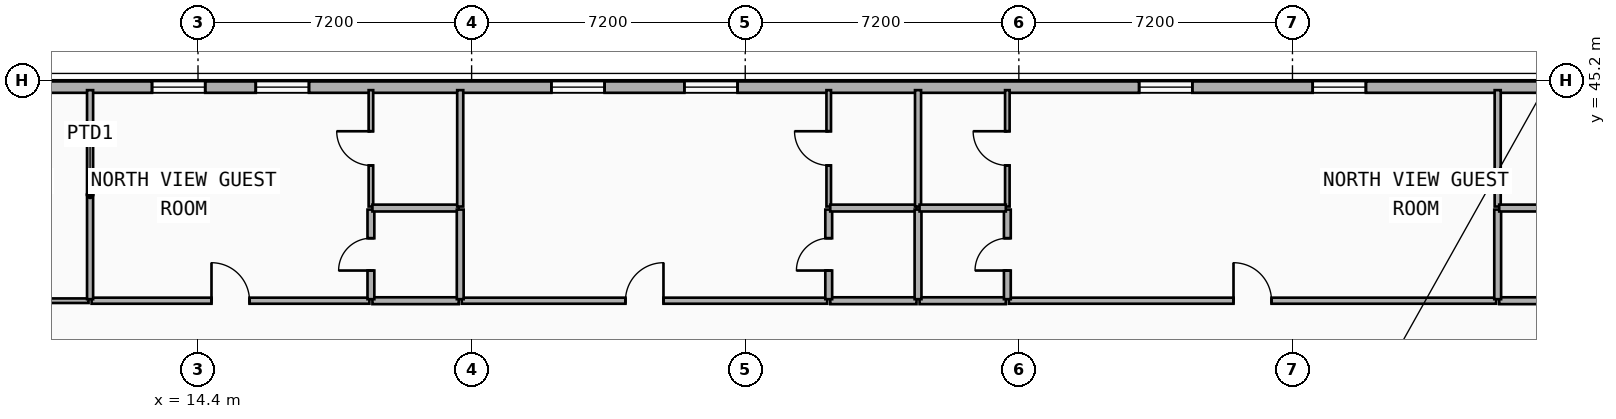
"""IFC4 building model, lengths in metres.
Left out: names, types, materials, properties, quantities, classifications, styles, units other than length and angle.
Written with IfcOpenShell. Run it as: python <this file> out.ifc"""

import sys

from ifc_helpers import new_model, si_unit, direction, frame, frame_2d, origin, place, context, subcontext, project, spatial, rectangle, extrude, element, fill, save


model = new_model("IFC4")
c1 = context("Model", 3, precision=1e-05, world=origin(), true_north=direction((0.0, 1.0)))
c2 = subcontext(c1, "Body", "Model", "MODEL_VIEW")
j1 = project(units=[si_unit("LENGTHUNIT", "METRE"), si_unit("PLANEANGLEUNIT", "RADIAN")], contexts=[c1])
p1 = place(None, origin())
s1 = spatial("IfcSite", under=j1, at=p1, CompositionType="ELEMENT")
p2 = place(p1, origin())
s2 = spatial("IfcBuilding", under=s1, at=p2, CompositionType="ELEMENT")
p3 = place(p2, frame((0.0, 0.0, 50.0)))
s3 = spatial("IfcBuildingStorey", under=s2, at=p3, CompositionType="ELEMENT", Elevation=50.0)
p4 = place(p3, frame((4.2, 45.02, 0.0), z_axis=(0.0, 0.0, 1.0), x_axis=(1.0, 0.0, 0.0)))
e1 = element("IfcWall", 1, at=p4, inside=s3, PredefinedType="SOLIDWALL", context=c2, shape_type="SweptSolid", body=[
    extrude(rectangle(XDim=49.2, YDim=0.3, at=frame_2d((24.6, 0.0))), origin(), (0.0, 0.0, 1.0), 3.24),
])
p5 = place(p4, frame((8.99, 0.0, 0.85)))
e2 = element("IfcOpeningElement", 2, at=p5, cuts=e1, PredefinedType="OPENING", context=c2, shape_type="SweptSolid", body=[
    extrude(rectangle(XDim=1.4, YDim=1.8, at=frame_2d((0.7, 0.9))), frame((0.0, 0.16, 0.0), z_axis=(0.0, -1.0, 0.0), x_axis=(1.0, 0.0, 0.0)), (0.0, 0.0, 1.0), 0.32),
])
p6 = place(p4, frame((11.72, 0.0, 0.85)))
e3 = element("IfcOpeningElement", 3, at=p6, cuts=e1, PredefinedType="OPENING", context=c2, shape_type="SweptSolid", body=[
    extrude(rectangle(XDim=1.4, YDim=1.8, at=frame_2d((0.7, 0.9))), frame((0.0, 0.16, 0.0), z_axis=(0.0, -1.0, 0.0), x_axis=(1.0, 0.0, 0.0)), (0.0, 0.0, 1.0), 0.32),
])
p7 = place(p4, frame((19.499, 0.0, 0.85)))
e4 = element("IfcOpeningElement", 4, at=p7, cuts=e1, PredefinedType="OPENING", context=c2, shape_type="SweptSolid", body=[
    extrude(rectangle(XDim=1.4, YDim=1.8, at=frame_2d((0.7, 0.9))), frame((0.0, 0.16, 0.0), z_axis=(0.0, -1.0, 0.0), x_axis=(1.0, 0.0, 0.0)), (0.0, 0.0, 1.0), 0.32),
])
p8 = place(p4, frame((22.998, 0.0, 0.85)))
e5 = element("IfcOpeningElement", 5, at=p8, cuts=e1, PredefinedType="OPENING", context=c2, shape_type="SweptSolid", body=[
    extrude(rectangle(XDim=1.4, YDim=1.8, at=frame_2d((0.7, 0.9))), frame((0.0, 0.16, 0.0), z_axis=(0.0, -1.0, 0.0), x_axis=(1.0, 0.0, 0.0)), (0.0, 0.0, 1.0), 0.32),
])
p9 = place(p4, frame((34.965, 0.0, 0.85)))
e6 = element("IfcOpeningElement", 6, at=p9, cuts=e1, PredefinedType="OPENING", context=c2, shape_type="SweptSolid", body=[
    extrude(rectangle(XDim=1.4, YDim=1.8, at=frame_2d((0.7, 0.9))), frame((0.0, 0.16, 0.0), z_axis=(0.0, -1.0, 0.0), x_axis=(1.0, 0.0, 0.0)), (0.0, 0.0, 1.0), 0.32),
])
p10 = place(p4, frame((39.532, 0.0, 0.85)))
e7 = element("IfcOpeningElement", 7, at=p10, cuts=e1, PredefinedType="OPENING", context=c2, shape_type="SweptSolid", body=[
    extrude(rectangle(XDim=1.4, YDim=1.8, at=frame_2d((0.7, 0.9))), frame((0.0, 0.16, 0.0), z_axis=(0.0, -1.0, 0.0), x_axis=(1.0, 0.0, 0.0)), (0.0, 0.0, 1.0), 0.32),
])
p11 = place(p4, frame((47.265, 0.0, 0.85)))
e8 = element("IfcOpeningElement", 8, at=p11, cuts=e1, PredefinedType="OPENING", context=c2, shape_type="SweptSolid", body=[
    extrude(rectangle(XDim=1.4, YDim=1.8, at=frame_2d((0.7, 0.9))), frame((0.0, 0.16, 0.0), z_axis=(0.0, -1.0, 0.0), x_axis=(1.0, 0.0, 0.0)), (0.0, 0.0, 1.0), 0.32),
])
p12 = place(p3, frame((0.26, 39.4, 0.0), z_axis=(0.0, 0.0, 1.0), x_axis=(1.0, 0.0, 0.0)))
e9 = element("IfcWall", 9, at=p12, inside=s3, PredefinedType="PARTITIONING", context=c2, shape_type="SweptSolid", body=[
    extrude(rectangle(XDim=11.26, YDim=0.12, at=frame_2d((5.63, 0.0))), origin(), (0.0, 0.0, 1.0), 3.24),
])
p13 = place(p12, frame((5.18, 0.0, 0.0)))
e10 = element("IfcOpeningElement", 10, at=p13, cuts=e9, PredefinedType="OPENING", context=c2, shape_type="SweptSolid", body=[
    extrude(rectangle(XDim=0.9, YDim=2.1, at=frame_2d((0.45, 1.05))), frame((0.0, 0.07, 0.0), z_axis=(0.0, -1.0, 0.0), x_axis=(1.0, 0.0, 0.0)), (0.0, 0.0, 1.0), 0.14),
])
p14 = place(p3, frame((11.6, 39.4, 0.0), z_axis=(0.0, 0.0, 1.0), x_axis=(1.0, 0.0, 0.0)))
e11 = element("IfcWall", 11, at=p14, inside=s3, PredefinedType="PARTITIONING", context=c2, shape_type="SweptSolid", body=[
    extrude(rectangle(XDim=7.31, YDim=0.16, at=frame_2d((3.655, 0.0))), origin(), (0.0, 0.0, 1.0), 3.24),
])
p15 = place(p14, frame((3.155, 0.0, 0.0)))
e12 = element("IfcOpeningElement", 12, at=p15, cuts=e11, PredefinedType="OPENING", context=c2, shape_type="SweptSolid", body=[
    extrude(rectangle(XDim=1.0, YDim=2.15, at=frame_2d((0.5, 1.075))), frame((0.0, 0.09, 0.0), z_axis=(0.0, -1.0, 0.0), x_axis=(1.0, 0.0, 0.0)), (0.0, 0.0, 1.0), 0.18),
])
p16 = place(p3, frame((18.99, 39.4, 0.0), z_axis=(0.0, 0.0, 1.0), x_axis=(1.0, 0.0, 0.0)))
e13 = element("IfcWall", 13, at=p16, inside=s3, PredefinedType="PLUMBINGWALL", context=c2, shape_type="SweptSolid", body=[
    extrude(rectangle(XDim=2.27, YDim=0.18, at=frame_2d((1.135, 0.0))), origin(), (0.0, 0.0, 1.0), 3.24),
])
p17 = place(p3, frame((21.34, 39.4, 0.0), z_axis=(0.0, 0.0, 1.0), x_axis=(1.0, 0.0, 0.0)))
e14 = element("IfcWall", 14, at=p17, inside=s3, PredefinedType="PARTITIONING", context=c2, shape_type="SweptSolid", body=[
    extrude(rectangle(XDim=9.617, YDim=0.16, at=frame_2d((4.809, 0.0))), origin(), (0.0, 0.0, 1.0), 3.24),
])
p18 = place(p17, frame((4.309, 0.0, 0.0)))
e15 = element("IfcOpeningElement", 15, at=p18, cuts=e14, PredefinedType="OPENING", context=c2, shape_type="SweptSolid", body=[
    extrude(rectangle(XDim=1.0, YDim=2.15, at=frame_2d((0.5, 1.075))), frame((0.0, 0.09, 0.0), z_axis=(0.0, -1.0, 0.0), x_axis=(1.0, 0.0, 0.0)), (0.0, 0.0, 1.0), 0.18),
])
p19 = place(p3, frame((31.037, 39.4, 0.0), z_axis=(0.0, 0.0, 1.0), x_axis=(1.0, 0.0, 0.0)))
e16 = element("IfcWall", 16, at=p19, inside=s3, PredefinedType="PLUMBINGWALL", context=c2, shape_type="SweptSolid", body=[
    extrude(rectangle(XDim=2.27, YDim=0.18, at=frame_2d((1.135, 0.0))), origin(), (0.0, 0.0, 1.0), 3.24),
])
p20 = place(p3, frame((35.737, 39.4, 0.0), z_axis=(0.0, 0.0, 1.0), x_axis=(1.0, 0.0, 0.0)))
e17 = element("IfcWall", 17, at=p20, inside=s3, PredefinedType="PARTITIONING", context=c2, shape_type="SweptSolid", body=[
    extrude(rectangle(XDim=12.823, YDim=0.16, at=frame_2d((6.412, 0.0))), origin(), (0.0, 0.0, 1.0), 3.24),
])
p21 = place(p20, frame((5.912, 0.0, 0.0)))
e18 = element("IfcOpeningElement", 18, at=p21, cuts=e17, PredefinedType="OPENING", context=c2, shape_type="SweptSolid", body=[
    extrude(rectangle(XDim=1.0, YDim=2.15, at=frame_2d((0.5, 1.075))), frame((0.0, 0.09, 0.0), z_axis=(0.0, -1.0, 0.0), x_axis=(1.0, 0.0, 0.0)), (0.0, 0.0, 1.0), 0.18),
])
for number, where, z_axis, x_axis in (
    (19, (33.387, 39.4, 0.0), (0.0, 0.0, 1.0), (1.0, 0.0, 0.0)),
    (20, (48.64, 39.4, 0.0), (0.0, 0.0, 1.0), (1.0, 0.0, 0.0)),
):
    element("IfcWall", number, at=place(p3, frame(where, z_axis=z_axis, x_axis=x_axis)), inside=s3, PredefinedType="PLUMBINGWALL", context=c2, shape_type="SweptSolid", body=[
        extrude(rectangle(XDim=2.27, YDim=0.18, at=frame_2d((1.135, 0.0))), origin(), (0.0, 0.0, 1.0), 3.24),
    ])
p22 = place(p3, frame((11.56, 39.44, 0.0), z_axis=(0.0, 0.0, 1.0), x_axis=(0.0, 1.0, 0.0)))
e21 = element("IfcWall", 21, at=p22, inside=s3, PredefinedType="PARTITIONING", context=c2, shape_type="SweptSolid", body=[
    extrude(rectangle(XDim=5.5, YDim=0.16, at=frame_2d((2.75, 0.0))), origin(), (0.0, 0.0, 1.0), 3.24),
])
p23 = place(p3, frame((18.95, 39.44, 0.0), z_axis=(0.0, 0.0, 1.0), x_axis=(0.0, 1.0, 0.0)))
e22 = element("IfcWall", 22, at=p23, inside=s3, PredefinedType="PLUMBINGWALL", context=c2, shape_type="SweptSolid", body=[
    extrude(rectangle(XDim=2.358, YDim=0.18, at=frame_2d((1.179, 0.0))), origin(), (0.0, 0.0, 1.0), 3.24),
])
p24 = place(p23, frame((0.754, 0.0, 0.0)))
e23 = element("IfcOpeningElement", 23, at=p24, cuts=e22, PredefinedType="OPENING", context=c2, shape_type="SweptSolid", body=[
    extrude(rectangle(XDim=0.85, YDim=2.1, at=frame_2d((0.425, 1.05))), frame((0.0, 0.1, 0.0), z_axis=(0.0, -1.0, 0.0), x_axis=(1.0, 0.0, 0.0)), (0.0, 0.0, 1.0), 0.2),
])
p25 = place(p3, frame((18.95, 41.878, 0.0), z_axis=(0.0, 0.0, 1.0), x_axis=(0.0, 1.0, 0.0)))
e24 = element("IfcWall", 24, at=p25, inside=s3, PredefinedType="PARTITIONING", context=c2, shape_type="SweptSolid", body=[
    extrude(rectangle(XDim=3.062, YDim=0.12, at=frame_2d((1.531, 0.0))), origin(), (0.0, 0.0, 1.0), 3.24),
])
p26 = place(p25, frame((1.081, 0.0, 0.0)))
e25 = element("IfcOpeningElement", 25, at=p26, cuts=e24, PredefinedType="OPENING", context=c2, shape_type="SweptSolid", body=[
    extrude(rectangle(XDim=0.9, YDim=2.1, at=frame_2d((0.45, 1.05))), frame((0.0, 0.07, 0.0), z_axis=(0.0, -1.0, 0.0), x_axis=(1.0, 0.0, 0.0)), (0.0, 0.0, 1.0), 0.14),
])
p27 = place(p3, frame((18.99, 41.838, 0.0), z_axis=(0.0, 0.0, 1.0), x_axis=(1.0, 0.0, 0.0)))
e26 = element("IfcWall", 26, at=p27, inside=s3, PredefinedType="PLUMBINGWALL", context=c2, shape_type="SweptSolid", body=[
    extrude(rectangle(XDim=2.27, YDim=0.18, at=frame_2d((1.135, 0.0))), origin(), (0.0, 0.0, 1.0), 3.24),
])
p28 = place(p3, frame((21.3, 39.44, 0.0), z_axis=(0.0, 0.0, 1.0), x_axis=(0.0, 1.0, 0.0)))
e27 = element("IfcWall", 27, at=p28, inside=s3, PredefinedType="PLUMBINGWALL", context=c2, shape_type="SweptSolid", body=[
    extrude(rectangle(XDim=2.358, YDim=0.18, at=frame_2d((1.179, 0.0))), origin(), (0.0, 0.0, 1.0), 3.24),
])
p29 = place(p3, frame((21.3, 41.878, 0.0), z_axis=(0.0, 0.0, 1.0), x_axis=(0.0, 1.0, 0.0)))
e28 = element("IfcWall", 28, at=p29, inside=s3, PredefinedType="PARTITIONING", context=c2, shape_type="SweptSolid", body=[
    extrude(rectangle(XDim=3.062, YDim=0.16, at=frame_2d((1.531, 0.0))), origin(), (0.0, 0.0, 1.0), 3.24),
])
p30 = place(p3, frame((30.997, 39.44, 0.0), z_axis=(0.0, 0.0, 1.0), x_axis=(0.0, 1.0, 0.0)))
e29 = element("IfcWall", 29, at=p30, inside=s3, PredefinedType="PLUMBINGWALL", context=c2, shape_type="SweptSolid", body=[
    extrude(rectangle(XDim=2.358, YDim=0.18, at=frame_2d((1.179, 0.0))), origin(), (0.0, 0.0, 1.0), 3.24),
])
p31 = place(p30, frame((0.754, 0.0, 0.0)))
e30 = element("IfcOpeningElement", 30, at=p31, cuts=e29, PredefinedType="OPENING", context=c2, shape_type="SweptSolid", body=[
    extrude(rectangle(XDim=0.85, YDim=2.1, at=frame_2d((0.425, 1.05))), frame((0.0, 0.1, 0.0), z_axis=(0.0, -1.0, 0.0), x_axis=(1.0, 0.0, 0.0)), (0.0, 0.0, 1.0), 0.2),
])
p32 = place(p3, frame((30.997, 41.878, 0.0), z_axis=(0.0, 0.0, 1.0), x_axis=(0.0, 1.0, 0.0)))
e31 = element("IfcWall", 31, at=p32, inside=s3, PredefinedType="PARTITIONING", context=c2, shape_type="SweptSolid", body=[
    extrude(rectangle(XDim=3.062, YDim=0.12, at=frame_2d((1.531, 0.0))), origin(), (0.0, 0.0, 1.0), 3.24),
])
p33 = place(p32, frame((1.081, 0.0, 0.0)))
e32 = element("IfcOpeningElement", 32, at=p33, cuts=e31, PredefinedType="OPENING", context=c2, shape_type="SweptSolid", body=[
    extrude(rectangle(XDim=0.9, YDim=2.1, at=frame_2d((0.45, 1.05))), frame((0.0, 0.07, 0.0), z_axis=(0.0, -1.0, 0.0), x_axis=(1.0, 0.0, 0.0)), (0.0, 0.0, 1.0), 0.14),
])
p34 = place(p3, frame((31.037, 41.838, 0.0), z_axis=(0.0, 0.0, 1.0), x_axis=(1.0, 0.0, 0.0)))
e33 = element("IfcWall", 33, at=p34, inside=s3, PredefinedType="PLUMBINGWALL", context=c2, shape_type="SweptSolid", body=[
    extrude(rectangle(XDim=2.27, YDim=0.18, at=frame_2d((1.135, 0.0))), origin(), (0.0, 0.0, 1.0), 3.24),
])
p35 = place(p3, frame((33.347, 39.44, 0.0), z_axis=(0.0, 0.0, 1.0), x_axis=(0.0, 1.0, 0.0)))
e34 = element("IfcWall", 34, at=p35, inside=s3, PredefinedType="PLUMBINGWALL", context=c2, shape_type="SweptSolid", body=[
    extrude(rectangle(XDim=2.358, YDim=0.18, at=frame_2d((1.179, 0.0))), origin(), (0.0, 0.0, 1.0), 3.24),
])
p36 = place(p3, frame((33.347, 41.878, 0.0), z_axis=(0.0, 0.0, 1.0), x_axis=(0.0, 1.0, 0.0)))
e35 = element("IfcWall", 35, at=p36, inside=s3, PredefinedType="PARTITIONING", context=c2, shape_type="SweptSolid", body=[
    extrude(rectangle(XDim=3.062, YDim=0.16, at=frame_2d((1.531, 0.0))), origin(), (0.0, 0.0, 1.0), 3.24),
])
p37 = place(p3, frame((35.697, 39.44, 0.0), z_axis=(0.0, 0.0, 1.0), x_axis=(0.0, 1.0, 0.0)))
e36 = element("IfcWall", 36, at=p37, inside=s3, PredefinedType="PLUMBINGWALL", context=c2, shape_type="SweptSolid", body=[
    extrude(rectangle(XDim=2.358, YDim=0.18, at=frame_2d((1.179, 0.0))), origin(), (0.0, 0.0, 1.0), 3.24),
])
p38 = place(p37, frame((0.754, 0.0, 0.0)))
e37 = element("IfcOpeningElement", 37, at=p38, cuts=e36, PredefinedType="OPENING", context=c2, shape_type="SweptSolid", body=[
    extrude(rectangle(XDim=0.85, YDim=2.1, at=frame_2d((0.425, 1.05))), frame((0.0, 0.1, 0.0), z_axis=(0.0, -1.0, 0.0), x_axis=(1.0, 0.0, 0.0)), (0.0, 0.0, 1.0), 0.2),
])
p39 = place(p3, frame((35.697, 41.878, 0.0), z_axis=(0.0, 0.0, 1.0), x_axis=(0.0, 1.0, 0.0)))
e38 = element("IfcWall", 38, at=p39, inside=s3, PredefinedType="PARTITIONING", context=c2, shape_type="SweptSolid", body=[
    extrude(rectangle(XDim=3.062, YDim=0.12, at=frame_2d((1.531, 0.0))), origin(), (0.0, 0.0, 1.0), 3.24),
])
p40 = place(p39, frame((1.081, 0.0, 0.0)))
e39 = element("IfcOpeningElement", 39, at=p40, cuts=e38, PredefinedType="OPENING", context=c2, shape_type="SweptSolid", body=[
    extrude(rectangle(XDim=0.9, YDim=2.1, at=frame_2d((0.45, 1.05))), frame((0.0, 0.07, 0.0), z_axis=(0.0, -1.0, 0.0), x_axis=(1.0, 0.0, 0.0)), (0.0, 0.0, 1.0), 0.14),
])
p41 = place(p3, frame((48.6, 39.44, 0.0), z_axis=(0.0, 0.0, 1.0), x_axis=(0.0, 1.0, 0.0)))
e40 = element("IfcWall", 40, at=p41, inside=s3, PredefinedType="PLUMBINGWALL", context=c2, shape_type="SweptSolid", body=[
    extrude(rectangle(XDim=2.358, YDim=0.18, at=frame_2d((1.179, 0.0))), origin(), (0.0, 0.0, 1.0), 3.24),
])
p42 = place(p3, frame((48.6, 41.878, 0.0), z_axis=(0.0, 0.0, 1.0), x_axis=(0.0, 1.0, 0.0)))
e41 = element("IfcWall", 41, at=p42, inside=s3, PredefinedType="PARTITIONING", context=c2, shape_type="SweptSolid", body=[
    extrude(rectangle(XDim=3.062, YDim=0.16, at=frame_2d((1.531, 0.0))), origin(), (0.0, 0.0, 1.0), 3.24),
])
for number, where, z_axis, x_axis in (
    (42, (33.387, 41.838, 0.0), (0.0, 0.0, 1.0), (1.0, 0.0, 0.0)),
    (43, (48.64, 41.838, 0.0), (0.0, 0.0, 1.0), (1.0, 0.0, 0.0)),
):
    element("IfcWall", number, at=place(p3, frame(where, z_axis=z_axis, x_axis=x_axis)), inside=s3, PredefinedType="PLUMBINGWALL", context=c2, shape_type="SweptSolid", body=[
        extrude(rectangle(XDim=2.27, YDim=0.18, at=frame_2d((1.135, 0.0))), origin(), (0.0, 0.0, 1.0), 3.24),
    ])
p43 = place(p5, origin())
e44 = element("IfcWindow", 44, at=p43, inside=s3, PartitioningType="SINGLE_PANEL", PredefinedType="WINDOW", context=c2, shape_type="SweptSolid", body=[
    extrude(rectangle(XDim=1.4, YDim=1.8, at=frame_2d((0.7, 0.9))), frame((0.0, 0.03, 0.0), z_axis=(0.0, -1.0, 0.0), x_axis=(1.0, 0.0, 0.0)), (0.0, 0.0, 1.0), 0.06),
])
fill(e2, e44)
p44 = place(p6, origin())
e45 = element("IfcWindow", 45, at=p44, inside=s3, PartitioningType="SINGLE_PANEL", PredefinedType="WINDOW", context=c2, shape_type="SweptSolid", body=[
    extrude(rectangle(XDim=1.4, YDim=1.8, at=frame_2d((0.7, 0.9))), frame((0.0, 0.03, 0.0), z_axis=(0.0, -1.0, 0.0), x_axis=(1.0, 0.0, 0.0)), (0.0, 0.0, 1.0), 0.06),
])
fill(e3, e45)
p45 = place(p7, origin())
e46 = element("IfcWindow", 46, at=p45, inside=s3, PartitioningType="SINGLE_PANEL", PredefinedType="WINDOW", context=c2, shape_type="SweptSolid", body=[
    extrude(rectangle(XDim=1.4, YDim=1.8, at=frame_2d((0.7, 0.9))), frame((0.0, 0.03, 0.0), z_axis=(0.0, -1.0, 0.0), x_axis=(1.0, 0.0, 0.0)), (0.0, 0.0, 1.0), 0.06),
])
fill(e4, e46)
p46 = place(p8, origin())
e47 = element("IfcWindow", 47, at=p46, inside=s3, PartitioningType="SINGLE_PANEL", PredefinedType="WINDOW", context=c2, shape_type="SweptSolid", body=[
    extrude(rectangle(XDim=1.4, YDim=1.8, at=frame_2d((0.7, 0.9))), frame((0.0, 0.03, 0.0), z_axis=(0.0, -1.0, 0.0), x_axis=(1.0, 0.0, 0.0)), (0.0, 0.0, 1.0), 0.06),
])
fill(e5, e47)
p47 = place(p9, origin())
e48 = element("IfcWindow", 48, at=p47, inside=s3, PartitioningType="SINGLE_PANEL", PredefinedType="WINDOW", context=c2, shape_type="SweptSolid", body=[
    extrude(rectangle(XDim=1.4, YDim=1.8, at=frame_2d((0.7, 0.9))), frame((0.0, 0.03, 0.0), z_axis=(0.0, -1.0, 0.0), x_axis=(1.0, 0.0, 0.0)), (0.0, 0.0, 1.0), 0.06),
])
fill(e6, e48)
p48 = place(p10, origin())
e49 = element("IfcWindow", 49, at=p48, inside=s3, PartitioningType="SINGLE_PANEL", PredefinedType="WINDOW", context=c2, shape_type="SweptSolid", body=[
    extrude(rectangle(XDim=1.4, YDim=1.8, at=frame_2d((0.7, 0.9))), frame((0.0, 0.03, 0.0), z_axis=(0.0, -1.0, 0.0), x_axis=(1.0, 0.0, 0.0)), (0.0, 0.0, 1.0), 0.06),
])
fill(e7, e49)
p49 = place(p15, origin())
e50 = element("IfcDoor", 50, at=p49, inside=s3, OperationType="SINGLE_SWING_LEFT", PredefinedType="DOOR", context=c2, shape_type="SweptSolid", body=[
    extrude(rectangle(XDim=1.0, YDim=2.15, at=frame_2d((0.5, 1.075))), frame((0.0, 0.025, 0.0), z_axis=(0.0, -1.0, 0.0), x_axis=(1.0, 0.0, 0.0)), (0.0, 0.0, 1.0), 0.05),
])
fill(e12, e50)
p50 = place(p18, origin())
e51 = element("IfcDoor", 51, at=p50, inside=s3, OperationType="SINGLE_SWING_RIGHT", PredefinedType="DOOR", context=c2, shape_type="SweptSolid", body=[
    extrude(rectangle(XDim=1.0, YDim=2.15, at=frame_2d((0.5, 1.075))), frame((0.0, 0.025, 0.0), z_axis=(0.0, -1.0, 0.0), x_axis=(1.0, 0.0, 0.0)), (0.0, 0.0, 1.0), 0.05),
])
fill(e15, e51)
p51 = place(p21, origin())
e52 = element("IfcDoor", 52, at=p51, inside=s3, OperationType="SINGLE_SWING_LEFT", PredefinedType="DOOR", context=c2, shape_type="SweptSolid", body=[
    extrude(rectangle(XDim=1.0, YDim=2.15, at=frame_2d((0.5, 1.075))), frame((0.0, 0.025, 0.0), z_axis=(0.0, -1.0, 0.0), x_axis=(1.0, 0.0, 0.0)), (0.0, 0.0, 1.0), 0.05),
])
fill(e18, e52)
p52 = place(p24, origin())
e53 = element("IfcDoor", 53, at=p52, inside=s3, OperationType="SINGLE_SWING_LEFT", PredefinedType="DOOR", context=c2, shape_type="SweptSolid", body=[
    extrude(rectangle(XDim=0.85, YDim=2.1, at=frame_2d((0.425, 1.05))), frame((0.0, 0.025, 0.0), z_axis=(0.0, -1.0, 0.0), x_axis=(1.0, 0.0, 0.0)), (0.0, 0.0, 1.0), 0.05),
])
fill(e23, e53)
p53 = place(p26, origin())
e54 = element("IfcDoor", 54, at=p53, inside=s3, OperationType="SINGLE_SWING_RIGHT", PredefinedType="DOOR", context=c2, shape_type="SweptSolid", body=[
    extrude(rectangle(XDim=0.9, YDim=2.1, at=frame_2d((0.45, 1.05))), frame((0.0, 0.025, 0.0), z_axis=(0.0, -1.0, 0.0), x_axis=(1.0, 0.0, 0.0)), (0.0, 0.0, 1.0), 0.05),
])
fill(e25, e54)
p54 = place(p31, origin())
e55 = element("IfcDoor", 55, at=p54, inside=s3, OperationType="SINGLE_SWING_LEFT", PredefinedType="DOOR", context=c2, shape_type="SweptSolid", body=[
    extrude(rectangle(XDim=0.85, YDim=2.1, at=frame_2d((0.425, 1.05))), frame((0.0, 0.025, 0.0), z_axis=(0.0, -1.0, 0.0), x_axis=(1.0, 0.0, 0.0)), (0.0, 0.0, 1.0), 0.05),
])
fill(e30, e55)
p55 = place(p33, origin())
e56 = element("IfcDoor", 56, at=p55, inside=s3, OperationType="SINGLE_SWING_RIGHT", PredefinedType="DOOR", context=c2, shape_type="SweptSolid", body=[
    extrude(rectangle(XDim=0.9, YDim=2.1, at=frame_2d((0.45, 1.05))), frame((0.0, 0.025, 0.0), z_axis=(0.0, -1.0, 0.0), x_axis=(1.0, 0.0, 0.0)), (0.0, 0.0, 1.0), 0.05),
])
fill(e32, e56)
p56 = place(p38, origin())
e57 = element("IfcDoor", 57, at=p56, inside=s3, OperationType="SINGLE_SWING_LEFT", PredefinedType="DOOR", context=c2, shape_type="SweptSolid", body=[
    extrude(rectangle(XDim=0.85, YDim=2.1, at=frame_2d((0.425, 1.05))), frame((0.0, 0.025, 0.0), z_axis=(0.0, -1.0, 0.0), x_axis=(1.0, 0.0, 0.0)), (0.0, 0.0, 1.0), 0.05),
])
fill(e37, e57)
p57 = place(p40, origin())
e58 = element("IfcDoor", 58, at=p57, inside=s3, OperationType="SINGLE_SWING_RIGHT", PredefinedType="DOOR", context=c2, shape_type="SweptSolid", body=[
    extrude(rectangle(XDim=0.9, YDim=2.1, at=frame_2d((0.45, 1.05))), frame((0.0, 0.025, 0.0), z_axis=(0.0, -1.0, 0.0), x_axis=(1.0, 0.0, 0.0)), (0.0, 0.0, 1.0), 0.05),
])
fill(e39, e58)
save(model, sys.argv[1])
